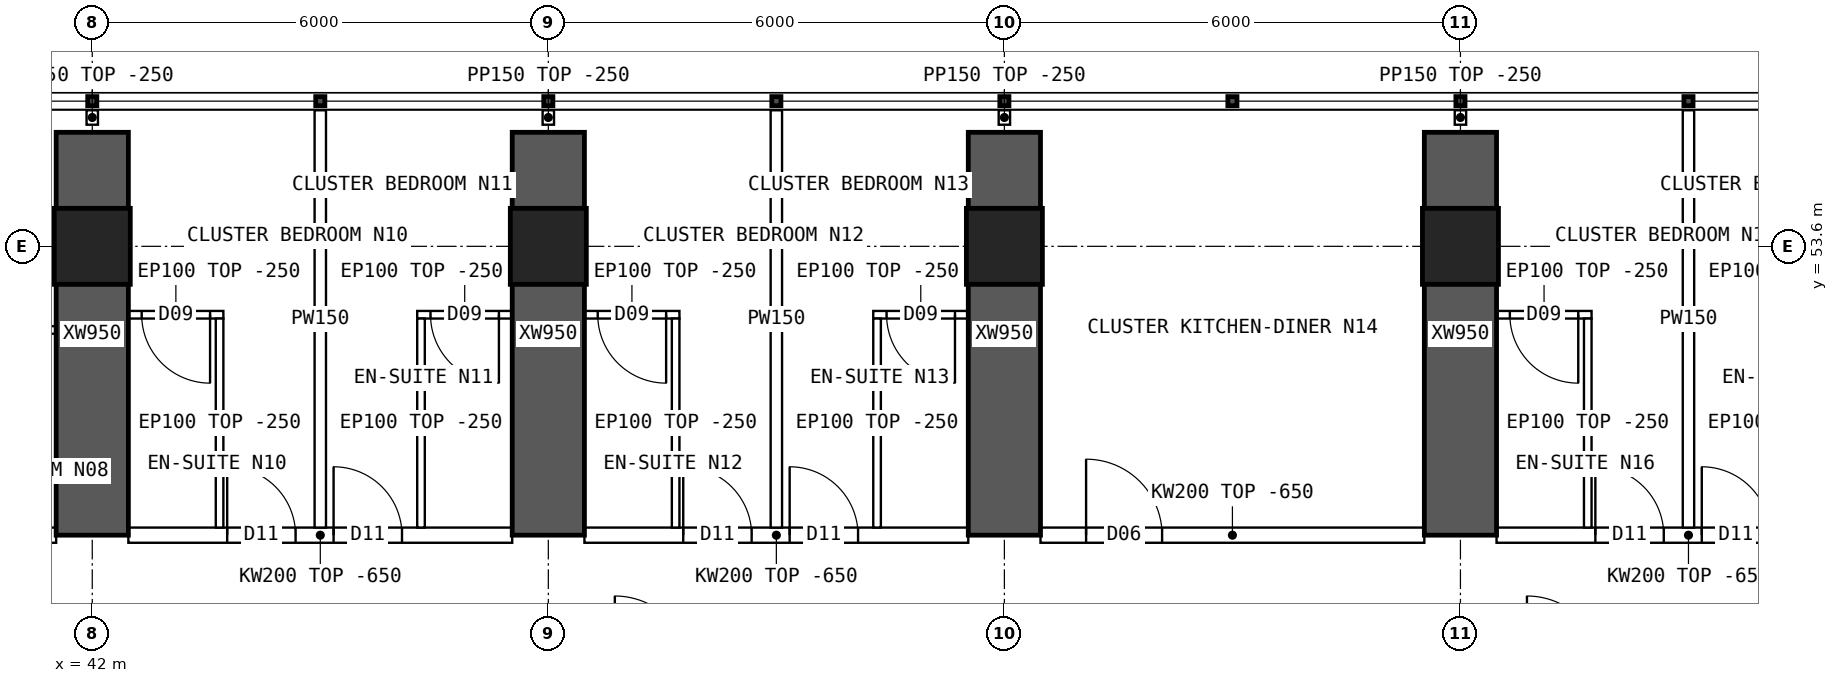
"""IFC4 building model, lengths in metres.
Left out: names, types, materials, properties, quantities, classifications, styles, units other than length and angle.
Written with IfcOpenShell. Run it as: python <this file> out.ifc"""

import sys

from ifc_helpers import new_model, si_unit, direction, frame, frame_2d, origin, origin_2d, place, context, subcontext, project, spatial, polyline, rectangle, hollow_rectangle, outline, extrude, element, fill, save


model = new_model("IFC4")
c1 = context("Model", 3, precision=1e-05, world=origin(), true_north=direction((0.0, 1.0)))
c2 = subcontext(c1, "Body", "Model", "MODEL_VIEW")
j1 = project(units=[si_unit("LENGTHUNIT", "METRE"), si_unit("PLANEANGLEUNIT", "RADIAN")], contexts=[c1])
p1 = place(None, origin())
s1 = spatial("IfcSite", under=j1, at=p1, CompositionType="ELEMENT")
p2 = place(p1, origin())
s2 = spatial("IfcBuilding", under=s1, at=p2, CompositionType="ELEMENT")
p3 = place(p2, frame((0.0, 0.0, 103.15)))
s3 = spatial("IfcBuildingStorey", under=s2, at=p3, CompositionType="ELEMENT", Elevation=103.15)
for number, where, z_axis, x_axis in (
    (1, (42.0, 53.6, 0.0), (0.0, 0.0, 1.0), (1.0, 0.0, 0.0)),
    (2, (48.0, 53.6, 0.0), (0.0, 0.0, 1.0), (1.0, 0.0, 0.0)),
    (3, (54.0, 53.6, 0.0), (0.0, 0.0, 1.0), (1.0, 0.0, 0.0)),
    (4, (60.0, 53.6, 0.0), (0.0, 0.0, 1.0), (1.0, 0.0, 0.0)),
):
    element("IfcColumn", number, at=place(p3, frame(where, z_axis=z_axis, x_axis=x_axis)), inside=s3, PredefinedType="COLUMN", context=c2, shape_type="SweptSolid", body=[
        extrude(hollow_rectangle(XDim=1.0, YDim=1.0, WallThickness=0.1, at=origin_2d()), origin(), (0.0, 0.0, 1.0), 3.75),
    ])
for number, where, z_axis, x_axis in (
    (5, (42.0, 49.8, 0.0), (0.0, 0.0, 1.0), (0.0, 1.0, 0.0)),
    (6, (48.0, 49.8, 0.0), (0.0, 0.0, 1.0), (0.0, 1.0, 0.0)),
    (7, (54.0, 49.8, 0.0), (0.0, 0.0, 1.0), (0.0, 1.0, 0.0)),
    (8, (60.0, 49.8, 0.0), (0.0, 0.0, 1.0), (0.0, 1.0, 0.0)),
):
    element("IfcWall", number, at=place(p3, frame(where, z_axis=z_axis, x_axis=x_axis)), inside=s3, PredefinedType="SHEAR", context=c2, shape_type="SweptSolid", body=[
        extrude(rectangle(XDim=5.3, YDim=0.95, at=frame_2d((2.65, 0.0))), origin(), (0.0, 0.0, 1.0), 3.75),
    ])
p4 = place(p3, frame((36.475, 49.8, 0.0), z_axis=(0.0, 0.0, 1.0), x_axis=(1.0, 0.0, 0.0)))
e9 = element("IfcWall", 9, at=p4, inside=s3, PredefinedType="SOLIDWALL", context=c2, shape_type="SweptSolid", body=[
    extrude(outline(polyline([(0.0, 0.0), (5.05, 0.0), (5.05, 3.1), (0.0, 3.1), (0.0, 0.0)])), frame((0.0, 0.1, 0.0), z_axis=(0.0, -1.0, 0.0), x_axis=(1.0, 0.0, 0.0)), (0.0, 0.0, 1.0), 0.2),
])
p5 = place(p4, frame((0.3, 0.0, 0.0)))
e10 = element("IfcOpeningElement", 10, at=p5, cuts=e9, PredefinedType="OPENING", context=c2, shape_type="SweptSolid", body=[
    extrude(rectangle(XDim=1.0, YDim=2.1, at=frame_2d((0.5, 1.05))), frame((0.0, 0.11, 0.0), z_axis=(0.0, -1.0, 0.0), x_axis=(1.0, 0.0, 0.0)), (0.0, 0.0, 1.0), 0.22),
])
p6 = place(p3, frame((42.475, 49.8, 0.0), z_axis=(0.0, 0.0, 1.0), x_axis=(1.0, 0.0, 0.0)))
e11 = element("IfcWall", 11, at=p6, inside=s3, PredefinedType="SOLIDWALL", context=c2, shape_type="SweptSolid", body=[
    extrude(outline(polyline([(0.0, 0.0), (5.05, 0.0), (5.05, 3.1), (0.0, 3.1), (0.0, 0.0)])), frame((0.0, 0.1, 0.0), z_axis=(0.0, -1.0, 0.0), x_axis=(1.0, 0.0, 0.0)), (0.0, 0.0, 1.0), 0.2),
])
p7 = place(p6, frame((1.3, 0.0, 0.0)))
e12 = element("IfcOpeningElement", 12, at=p7, cuts=e11, PredefinedType="OPENING", context=c2, shape_type="SweptSolid", body=[
    extrude(rectangle(XDim=0.9, YDim=2.1, at=frame_2d((0.45, 1.05))), frame((0.0, 0.11, 0.0), z_axis=(0.0, -1.0, 0.0), x_axis=(1.0, 0.0, 0.0)), (0.0, 0.0, 1.0), 0.22),
])
p8 = place(p6, frame((2.7, 0.0, 0.0)))
e13 = element("IfcOpeningElement", 13, at=p8, cuts=e11, PredefinedType="OPENING", context=c2, shape_type="SweptSolid", body=[
    extrude(rectangle(XDim=0.9, YDim=2.1, at=frame_2d((0.45, 1.05))), frame((0.0, 0.11, 0.0), z_axis=(0.0, -1.0, 0.0), x_axis=(1.0, 0.0, 0.0)), (0.0, 0.0, 1.0), 0.22),
])
p9 = place(p3, frame((48.475, 49.8, 0.0), z_axis=(0.0, 0.0, 1.0), x_axis=(1.0, 0.0, 0.0)))
e14 = element("IfcWall", 14, at=p9, inside=s3, PredefinedType="SOLIDWALL", context=c2, shape_type="SweptSolid", body=[
    extrude(outline(polyline([(0.0, 0.0), (5.05, 0.0), (5.05, 3.1), (0.0, 3.1), (0.0, 0.0)])), frame((0.0, 0.1, 0.0), z_axis=(0.0, -1.0, 0.0), x_axis=(1.0, 0.0, 0.0)), (0.0, 0.0, 1.0), 0.2),
])
p10 = place(p9, frame((1.3, 0.0, 0.0)))
e15 = element("IfcOpeningElement", 15, at=p10, cuts=e14, PredefinedType="OPENING", context=c2, shape_type="SweptSolid", body=[
    extrude(rectangle(XDim=0.9, YDim=2.1, at=frame_2d((0.45, 1.05))), frame((0.0, 0.11, 0.0), z_axis=(0.0, -1.0, 0.0), x_axis=(1.0, 0.0, 0.0)), (0.0, 0.0, 1.0), 0.22),
])
p11 = place(p9, frame((2.7, 0.0, 0.0)))
e16 = element("IfcOpeningElement", 16, at=p11, cuts=e14, PredefinedType="OPENING", context=c2, shape_type="SweptSolid", body=[
    extrude(rectangle(XDim=0.9, YDim=2.1, at=frame_2d((0.45, 1.05))), frame((0.0, 0.11, 0.0), z_axis=(0.0, -1.0, 0.0), x_axis=(1.0, 0.0, 0.0)), (0.0, 0.0, 1.0), 0.22),
])
p12 = place(p3, frame((54.475, 49.8, 0.0), z_axis=(0.0, 0.0, 1.0), x_axis=(1.0, 0.0, 0.0)))
e17 = element("IfcWall", 17, at=p12, inside=s3, PredefinedType="SOLIDWALL", context=c2, shape_type="SweptSolid", body=[
    extrude(outline(polyline([(0.0, 0.0), (5.05, 0.0), (5.05, 3.1), (0.0, 3.1), (0.0, 0.0)])), frame((0.0, 0.1, 0.0), z_axis=(0.0, -1.0, 0.0), x_axis=(1.0, 0.0, 0.0)), (0.0, 0.0, 1.0), 0.2),
])
p13 = place(p12, frame((0.6, 0.0, 0.0)))
e18 = element("IfcOpeningElement", 18, at=p13, cuts=e17, PredefinedType="OPENING", context=c2, shape_type="SweptSolid", body=[
    extrude(rectangle(XDim=1.0, YDim=2.1, at=frame_2d((0.5, 1.05))), frame((0.0, 0.11, 0.0), z_axis=(0.0, -1.0, 0.0), x_axis=(1.0, 0.0, 0.0)), (0.0, 0.0, 1.0), 0.22),
])
p14 = place(p3, frame((60.475, 49.8, 0.0), z_axis=(0.0, 0.0, 1.0), x_axis=(1.0, 0.0, 0.0)))
e19 = element("IfcWall", 19, at=p14, inside=s3, PredefinedType="SOLIDWALL", context=c2, shape_type="SweptSolid", body=[
    extrude(outline(polyline([(0.0, 0.0), (5.05, 0.0), (5.05, 3.1), (0.0, 3.1), (0.0, 0.0)])), frame((0.0, 0.1, 0.0), z_axis=(0.0, -1.0, 0.0), x_axis=(1.0, 0.0, 0.0)), (0.0, 0.0, 1.0), 0.2),
])
p15 = place(p14, frame((1.3, 0.0, 0.0)))
e20 = element("IfcOpeningElement", 20, at=p15, cuts=e19, PredefinedType="OPENING", context=c2, shape_type="SweptSolid", body=[
    extrude(rectangle(XDim=0.9, YDim=2.1, at=frame_2d((0.45, 1.05))), frame((0.0, 0.11, 0.0), z_axis=(0.0, -1.0, 0.0), x_axis=(1.0, 0.0, 0.0)), (0.0, 0.0, 1.0), 0.22),
])
p16 = place(p14, frame((2.7, 0.0, 0.0)))
e21 = element("IfcOpeningElement", 21, at=p16, cuts=e19, PredefinedType="OPENING", context=c2, shape_type="SweptSolid", body=[
    extrude(rectangle(XDim=0.9, YDim=2.1, at=frame_2d((0.45, 1.05))), frame((0.0, 0.11, 0.0), z_axis=(0.0, -1.0, 0.0), x_axis=(1.0, 0.0, 0.0)), (0.0, 0.0, 1.0), 0.22),
])
p17 = place(p3, frame((38.875, 52.5, 0.0), z_axis=(0.0, 0.0, 1.0), x_axis=(1.0, 0.0, 0.0)))
e22 = element("IfcWall", 22, at=p17, inside=s3, PredefinedType="PARTITIONING", context=c2, shape_type="SweptSolid", body=[
    extrude(rectangle(XDim=2.65, YDim=0.1, at=frame_2d((1.325, 0.0))), origin(), (0.0, 0.0, 1.0), 3.5),
])
p18 = place(p3, frame((45.0, 55.39, 0.0), z_axis=(0.0, 0.0, 1.0), x_axis=(0.0, -1.0, 0.0)))
e23 = element("IfcWall", 23, at=p18, inside=s3, PredefinedType="PARTITIONING", context=c2, shape_type="SweptSolid", body=[
    extrude(outline(polyline([(0.0, 0.0), (5.49, 0.0), (5.49, 3.1), (5.442, 3.1), (5.44, 3.5), (1.992, 3.5), (1.99, 3.1), (1.592, 3.1), (1.59, 3.5), (0.0, 3.5), (0.0, 0.0)])), frame((0.0, 0.075, 0.0), z_axis=(0.0, -1.0, 0.0), x_axis=(1.0, 0.0, 0.0)), (0.0, 0.0, 1.0), 0.15),
])
p19 = place(p3, frame((42.475, 52.7, 0.0), z_axis=(0.0, 0.0, 1.0), x_axis=(1.0, 0.0, 0.0)))
e24 = element("IfcWall", 24, at=p19, inside=s3, PredefinedType="PARTITIONING", context=c2, shape_type="SweptSolid", body=[
    extrude(rectangle(XDim=1.25, YDim=0.1, at=frame_2d((0.625, 0.0))), origin(), (0.0, 0.0, 1.0), 3.5),
])
p20 = place(p19, frame((0.175, 0.0, 0.0)))
e25 = element("IfcOpeningElement", 25, at=p20, cuts=e24, PredefinedType="OPENING", context=c2, shape_type="SweptSolid", body=[
    extrude(rectangle(XDim=0.9, YDim=2.1, at=frame_2d((0.45, 1.05))), frame((0.0, 0.06, 0.0), z_axis=(0.0, -1.0, 0.0), x_axis=(1.0, 0.0, 0.0)), (0.0, 0.0, 1.0), 0.12),
])
p21 = place(p3, frame((43.675, 52.65, 0.0), z_axis=(0.0, 0.0, 1.0), x_axis=(0.0, -1.0, 0.0)))
e26 = element("IfcWall", 26, at=p21, inside=s3, PredefinedType="PARTITIONING", context=c2, shape_type="SweptSolid", body=[
    extrude(outline(polyline([(0.0, 0.0), (2.75, 0.0), (2.75, 3.1), (2.702, 3.1), (2.7, 3.5), (0.0, 3.5), (0.0, 0.0)])), frame((0.0, 0.05, 0.0), z_axis=(0.0, -1.0, 0.0), x_axis=(1.0, 0.0, 0.0)), (0.0, 0.0, 1.0), 0.1),
])
p22 = place(p3, frame((46.275, 52.7, 0.0), z_axis=(0.0, 0.0, 1.0), x_axis=(1.0, 0.0, 0.0)))
e27 = element("IfcWall", 27, at=p22, inside=s3, PredefinedType="PARTITIONING", context=c2, shape_type="SweptSolid", body=[
    extrude(rectangle(XDim=1.25, YDim=0.1, at=frame_2d((0.625, 0.0))), origin(), (0.0, 0.0, 1.0), 3.5),
])
p23 = place(p22, frame((0.175, 0.0, 0.0)))
e28 = element("IfcOpeningElement", 28, at=p23, cuts=e27, PredefinedType="OPENING", context=c2, shape_type="SweptSolid", body=[
    extrude(rectangle(XDim=0.9, YDim=2.1, at=frame_2d((0.45, 1.05))), frame((0.0, 0.06, 0.0), z_axis=(0.0, -1.0, 0.0), x_axis=(1.0, 0.0, 0.0)), (0.0, 0.0, 1.0), 0.12),
])
p24 = place(p3, frame((46.325, 52.65, 0.0), z_axis=(0.0, 0.0, 1.0), x_axis=(0.0, -1.0, 0.0)))
e29 = element("IfcWall", 29, at=p24, inside=s3, PredefinedType="PARTITIONING", context=c2, shape_type="SweptSolid", body=[
    extrude(outline(polyline([(0.0, 0.0), (2.75, 0.0), (2.75, 3.1), (2.702, 3.1), (2.7, 3.5), (0.0, 3.5), (0.0, 0.0)])), frame((0.0, 0.05, 0.0), z_axis=(0.0, -1.0, 0.0), x_axis=(1.0, 0.0, 0.0)), (0.0, 0.0, 1.0), 0.1),
])
p25 = place(p3, frame((51.0, 55.39, 0.0), z_axis=(0.0, 0.0, 1.0), x_axis=(0.0, -1.0, 0.0)))
e30 = element("IfcWall", 30, at=p25, inside=s3, PredefinedType="PARTITIONING", context=c2, shape_type="SweptSolid", body=[
    extrude(outline(polyline([(0.0, 0.0), (5.49, 0.0), (5.49, 3.1), (5.442, 3.1), (5.44, 3.5), (1.992, 3.5), (1.99, 3.1), (1.592, 3.1), (1.59, 3.5), (0.0, 3.5), (0.0, 0.0)])), frame((0.0, 0.075, 0.0), z_axis=(0.0, -1.0, 0.0), x_axis=(1.0, 0.0, 0.0)), (0.0, 0.0, 1.0), 0.15),
])
p26 = place(p3, frame((48.475, 52.7, 0.0), z_axis=(0.0, 0.0, 1.0), x_axis=(1.0, 0.0, 0.0)))
e31 = element("IfcWall", 31, at=p26, inside=s3, PredefinedType="PARTITIONING", context=c2, shape_type="SweptSolid", body=[
    extrude(rectangle(XDim=1.25, YDim=0.1, at=frame_2d((0.625, 0.0))), origin(), (0.0, 0.0, 1.0), 3.5),
])
p27 = place(p26, frame((0.175, 0.0, 0.0)))
e32 = element("IfcOpeningElement", 32, at=p27, cuts=e31, PredefinedType="OPENING", context=c2, shape_type="SweptSolid", body=[
    extrude(rectangle(XDim=0.9, YDim=2.1, at=frame_2d((0.45, 1.05))), frame((0.0, 0.06, 0.0), z_axis=(0.0, -1.0, 0.0), x_axis=(1.0, 0.0, 0.0)), (0.0, 0.0, 1.0), 0.12),
])
p28 = place(p3, frame((49.675, 52.65, 0.0), z_axis=(0.0, 0.0, 1.0), x_axis=(0.0, -1.0, 0.0)))
e33 = element("IfcWall", 33, at=p28, inside=s3, PredefinedType="PARTITIONING", context=c2, shape_type="SweptSolid", body=[
    extrude(outline(polyline([(0.0, 0.0), (2.75, 0.0), (2.75, 3.1), (2.702, 3.1), (2.7, 3.5), (0.0, 3.5), (0.0, 0.0)])), frame((0.0, 0.05, 0.0), z_axis=(0.0, -1.0, 0.0), x_axis=(1.0, 0.0, 0.0)), (0.0, 0.0, 1.0), 0.1),
])
p29 = place(p3, frame((52.275, 52.7, 0.0), z_axis=(0.0, 0.0, 1.0), x_axis=(1.0, 0.0, 0.0)))
e34 = element("IfcWall", 34, at=p29, inside=s3, PredefinedType="PARTITIONING", context=c2, shape_type="SweptSolid", body=[
    extrude(rectangle(XDim=1.25, YDim=0.1, at=frame_2d((0.625, 0.0))), origin(), (0.0, 0.0, 1.0), 3.5),
])
p30 = place(p29, frame((0.175, 0.0, 0.0)))
e35 = element("IfcOpeningElement", 35, at=p30, cuts=e34, PredefinedType="OPENING", context=c2, shape_type="SweptSolid", body=[
    extrude(rectangle(XDim=0.9, YDim=2.1, at=frame_2d((0.45, 1.05))), frame((0.0, 0.06, 0.0), z_axis=(0.0, -1.0, 0.0), x_axis=(1.0, 0.0, 0.0)), (0.0, 0.0, 1.0), 0.12),
])
p31 = place(p3, frame((52.325, 52.65, 0.0), z_axis=(0.0, 0.0, 1.0), x_axis=(0.0, -1.0, 0.0)))
e36 = element("IfcWall", 36, at=p31, inside=s3, PredefinedType="PARTITIONING", context=c2, shape_type="SweptSolid", body=[
    extrude(outline(polyline([(0.0, 0.0), (2.75, 0.0), (2.75, 3.1), (2.702, 3.1), (2.7, 3.5), (0.0, 3.5), (0.0, 0.0)])), frame((0.0, 0.05, 0.0), z_axis=(0.0, -1.0, 0.0), x_axis=(1.0, 0.0, 0.0)), (0.0, 0.0, 1.0), 0.1),
])
p32 = place(p3, frame((63.0, 55.39, 0.0), z_axis=(0.0, 0.0, 1.0), x_axis=(0.0, -1.0, 0.0)))
e37 = element("IfcWall", 37, at=p32, inside=s3, PredefinedType="PARTITIONING", context=c2, shape_type="SweptSolid", body=[
    extrude(outline(polyline([(0.0, 0.0), (5.49, 0.0), (5.49, 3.1), (5.442, 3.1), (5.44, 3.5), (1.992, 3.5), (1.99, 3.1), (1.592, 3.1), (1.59, 3.5), (0.0, 3.5), (0.0, 0.0)])), frame((0.0, 0.075, 0.0), z_axis=(0.0, -1.0, 0.0), x_axis=(1.0, 0.0, 0.0)), (0.0, 0.0, 1.0), 0.15),
])
p33 = place(p3, frame((60.475, 52.7, 0.0), z_axis=(0.0, 0.0, 1.0), x_axis=(1.0, 0.0, 0.0)))
e38 = element("IfcWall", 38, at=p33, inside=s3, PredefinedType="PARTITIONING", context=c2, shape_type="SweptSolid", body=[
    extrude(rectangle(XDim=1.25, YDim=0.1, at=frame_2d((0.625, 0.0))), origin(), (0.0, 0.0, 1.0), 3.5),
])
p34 = place(p33, frame((0.175, 0.0, 0.0)))
e39 = element("IfcOpeningElement", 39, at=p34, cuts=e38, PredefinedType="OPENING", context=c2, shape_type="SweptSolid", body=[
    extrude(rectangle(XDim=0.9, YDim=2.1, at=frame_2d((0.45, 1.05))), frame((0.0, 0.06, 0.0), z_axis=(0.0, -1.0, 0.0), x_axis=(1.0, 0.0, 0.0)), (0.0, 0.0, 1.0), 0.12),
])
p35 = place(p3, frame((61.675, 52.65, 0.0), z_axis=(0.0, 0.0, 1.0), x_axis=(0.0, -1.0, 0.0)))
e40 = element("IfcWall", 40, at=p35, inside=s3, PredefinedType="PARTITIONING", context=c2, shape_type="SweptSolid", body=[
    extrude(outline(polyline([(0.0, 0.0), (2.75, 0.0), (2.75, 3.1), (2.702, 3.1), (2.7, 3.5), (0.0, 3.5), (0.0, 0.0)])), frame((0.0, 0.05, 0.0), z_axis=(0.0, -1.0, 0.0), x_axis=(1.0, 0.0, 0.0)), (0.0, 0.0, 1.0), 0.1),
])
for number, where, z_axis, x_axis in (
    (41, (42.0, 55.2, 0.0), (0.0, 0.0, 1.0), (0.0, 1.0, 0.0)),
    (42, (48.0, 55.2, 0.0), (0.0, 0.0, 1.0), (0.0, 1.0, 0.0)),
    (43, (54.0, 55.2, 0.0), (0.0, 0.0, 1.0), (0.0, 1.0, 0.0)),
    (44, (60.0, 55.2, 0.0), (0.0, 0.0, 1.0), (0.0, 1.0, 0.0)),
):
    element("IfcWall", number, at=place(p3, frame(where, z_axis=z_axis, x_axis=x_axis)), inside=s3, PredefinedType="PARTITIONING", context=c2, shape_type="SweptSolid", body=[
        extrude(rectangle(XDim=0.19, YDim=0.15, at=frame_2d((0.095, 0.0))), origin(), (0.0, 0.0, 1.0), 3.5),
    ])
p36 = place(p20, origin())
e45 = element("IfcDoor", 45, at=p36, inside=s3, OperationType="SINGLE_SWING_RIGHT", PredefinedType="DOOR", context=c2, shape_type="SweptSolid", body=[
    extrude(rectangle(XDim=0.9, YDim=2.1, at=frame_2d((0.45, 1.05))), frame((0.0, 0.025, 0.0), z_axis=(0.0, -1.0, 0.0), x_axis=(1.0, 0.0, 0.0)), (0.0, 0.0, 1.0), 0.05),
])
fill(e25, e45)
p37 = place(p7, origin())
e46 = element("IfcDoor", 46, at=p37, inside=s3, OperationType="SINGLE_SWING_LEFT", PredefinedType="DOOR", context=c2, shape_type="SweptSolid", body=[
    extrude(rectangle(XDim=0.9, YDim=2.1, at=frame_2d((0.45, 1.05))), frame((0.0, 0.025, 0.0), z_axis=(0.0, -1.0, 0.0), x_axis=(1.0, 0.0, 0.0)), (0.0, 0.0, 1.0), 0.05),
])
fill(e12, e46)
p38 = place(p23, origin())
e47 = element("IfcDoor", 47, at=p38, inside=s3, OperationType="SINGLE_SWING_RIGHT", PredefinedType="DOOR", context=c2, shape_type="SweptSolid", body=[
    extrude(rectangle(XDim=0.9, YDim=2.1, at=frame_2d((0.45, 1.05))), frame((0.0, 0.025, 0.0), z_axis=(0.0, -1.0, 0.0), x_axis=(1.0, 0.0, 0.0)), (0.0, 0.0, 1.0), 0.05),
])
fill(e28, e47)
p39 = place(p8, origin())
e48 = element("IfcDoor", 48, at=p39, inside=s3, OperationType="SINGLE_SWING_LEFT", PredefinedType="DOOR", context=c2, shape_type="SweptSolid", body=[
    extrude(rectangle(XDim=0.9, YDim=2.1, at=frame_2d((0.45, 1.05))), frame((0.0, 0.025, 0.0), z_axis=(0.0, -1.0, 0.0), x_axis=(1.0, 0.0, 0.0)), (0.0, 0.0, 1.0), 0.05),
])
fill(e13, e48)
p40 = place(p27, origin())
e49 = element("IfcDoor", 49, at=p40, inside=s3, OperationType="SINGLE_SWING_RIGHT", PredefinedType="DOOR", context=c2, shape_type="SweptSolid", body=[
    extrude(rectangle(XDim=0.9, YDim=2.1, at=frame_2d((0.45, 1.05))), frame((0.0, 0.025, 0.0), z_axis=(0.0, -1.0, 0.0), x_axis=(1.0, 0.0, 0.0)), (0.0, 0.0, 1.0), 0.05),
])
fill(e32, e49)
p41 = place(p10, origin())
e50 = element("IfcDoor", 50, at=p41, inside=s3, OperationType="SINGLE_SWING_LEFT", PredefinedType="DOOR", context=c2, shape_type="SweptSolid", body=[
    extrude(rectangle(XDim=0.9, YDim=2.1, at=frame_2d((0.45, 1.05))), frame((0.0, 0.025, 0.0), z_axis=(0.0, -1.0, 0.0), x_axis=(1.0, 0.0, 0.0)), (0.0, 0.0, 1.0), 0.05),
])
fill(e15, e50)
p42 = place(p30, origin())
e51 = element("IfcDoor", 51, at=p42, inside=s3, OperationType="SINGLE_SWING_RIGHT", PredefinedType="DOOR", context=c2, shape_type="SweptSolid", body=[
    extrude(rectangle(XDim=0.9, YDim=2.1, at=frame_2d((0.45, 1.05))), frame((0.0, 0.025, 0.0), z_axis=(0.0, -1.0, 0.0), x_axis=(1.0, 0.0, 0.0)), (0.0, 0.0, 1.0), 0.05),
])
fill(e35, e51)
p43 = place(p11, origin())
e52 = element("IfcDoor", 52, at=p43, inside=s3, OperationType="SINGLE_SWING_LEFT", PredefinedType="DOOR", context=c2, shape_type="SweptSolid", body=[
    extrude(rectangle(XDim=0.9, YDim=2.1, at=frame_2d((0.45, 1.05))), frame((0.0, 0.025, 0.0), z_axis=(0.0, -1.0, 0.0), x_axis=(1.0, 0.0, 0.0)), (0.0, 0.0, 1.0), 0.05),
])
fill(e16, e52)
p44 = place(p13, origin())
e53 = element("IfcDoor", 53, at=p44, inside=s3, OperationType="SINGLE_SWING_LEFT", PredefinedType="DOOR", context=c2, shape_type="SweptSolid", body=[
    extrude(rectangle(XDim=1.0, YDim=2.1, at=frame_2d((0.5, 1.05))), frame((0.0, 0.025, 0.0), z_axis=(0.0, -1.0, 0.0), x_axis=(1.0, 0.0, 0.0)), (0.0, 0.0, 1.0), 0.05),
])
fill(e18, e53)
p45 = place(p34, origin())
e54 = element("IfcDoor", 54, at=p45, inside=s3, OperationType="SINGLE_SWING_RIGHT", PredefinedType="DOOR", context=c2, shape_type="SweptSolid", body=[
    extrude(rectangle(XDim=0.9, YDim=2.1, at=frame_2d((0.45, 1.05))), frame((0.0, 0.025, 0.0), z_axis=(0.0, -1.0, 0.0), x_axis=(1.0, 0.0, 0.0)), (0.0, 0.0, 1.0), 0.05),
])
fill(e39, e54)
p46 = place(p15, origin())
e55 = element("IfcDoor", 55, at=p46, inside=s3, OperationType="SINGLE_SWING_LEFT", PredefinedType="DOOR", context=c2, shape_type="SweptSolid", body=[
    extrude(rectangle(XDim=0.9, YDim=2.1, at=frame_2d((0.45, 1.05))), frame((0.0, 0.025, 0.0), z_axis=(0.0, -1.0, 0.0), x_axis=(1.0, 0.0, 0.0)), (0.0, 0.0, 1.0), 0.05),
])
fill(e20, e55)
p47 = place(p16, origin())
e56 = element("IfcDoor", 56, at=p47, inside=s3, OperationType="SINGLE_SWING_LEFT", PredefinedType="DOOR", context=c2, shape_type="SweptSolid", body=[
    extrude(rectangle(XDim=0.9, YDim=2.1, at=frame_2d((0.45, 1.05))), frame((0.0, 0.025, 0.0), z_axis=(0.0, -1.0, 0.0), x_axis=(1.0, 0.0, 0.0)), (0.0, 0.0, 1.0), 0.05),
])
fill(e21, e56)
save(model, sys.argv[1])
